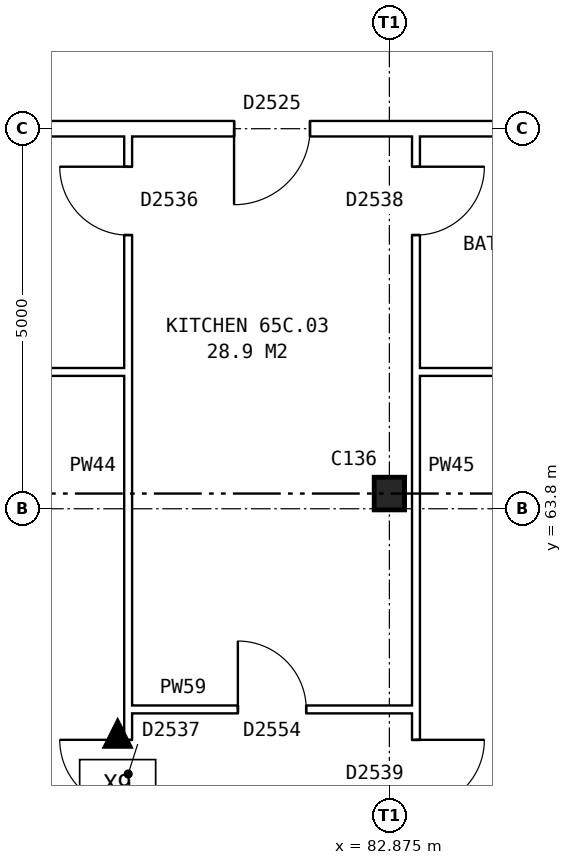
"""IFC4 building model, lengths in metres.
Left out: names, types, materials, properties, quantities, classifications, styles, units other than length and angle.
Written with IfcOpenShell. Run it as: python <this file> out.ifc"""

import sys

from ifc_helpers import new_model, si_unit, direction, frame, frame_2d, origin, origin_2d, place, context, subcontext, project, spatial, rectangle, i_section, extrude, element, fill, save


model = new_model("IFC4")
c1 = context("Model", 3, precision=1e-05, world=origin(), true_north=direction((0.0, 1.0)))
c2 = subcontext(c1, "Body", "Model", "MODEL_VIEW")
j1 = project(units=[si_unit("LENGTHUNIT", "METRE"), si_unit("PLANEANGLEUNIT", "RADIAN")], contexts=[c1])
p1 = place(None, origin())
s1 = spatial("IfcSite", under=j1, at=p1, CompositionType="ELEMENT")
p2 = place(p1, origin())
s2 = spatial("IfcBuilding", under=s1, at=p2, CompositionType="ELEMENT")
p3 = place(p2, frame((0.0, 0.0, 230.7)))
s3 = spatial("IfcBuildingStorey", under=s2, at=p3, CompositionType="ELEMENT", Elevation=230.7)
p4 = place(p3, frame((82.875, 64.0, 0.0), z_axis=(0.0, 0.0, 1.0), x_axis=(1.0, 0.0, 0.0)))
e1 = element("IfcColumn", 1, at=p4, inside=s3, PredefinedType="COLUMN", context=c2, shape_type="SweptSolid", body=[
    extrude(i_section(OverallWidth=0.4, OverallDepth=0.43, WebThickness=0.028, FlangeThickness=0.04, at=origin_2d()), origin(), (0.0, 0.0, 1.0), 2.85),
])
p5 = place(p3, frame((79.438, 61.16, 0.0), z_axis=(0.0, 0.0, 1.0), x_axis=(1.0, 0.0, 0.0)))
e2 = element("IfcWall", 2, at=p5, inside=s3, PredefinedType="PARTITIONING", context=c2, shape_type="SweptSolid", body=[
    extrude(rectangle(XDim=3.787, YDim=0.1, at=frame_2d((1.894, 0.0))), origin(), (0.0, 0.0, 1.0), 2.85),
])
p6 = place(p5, frame((1.444, 0.0, 0.0)))
e3 = element("IfcOpeningElement", 3, at=p6, cuts=e2, PredefinedType="OPENING", context=c2, shape_type="SweptSolid", body=[
    extrude(rectangle(XDim=0.9, YDim=2.1, at=frame_2d((0.45, 1.05))), frame((0.0, 0.06, 0.0), z_axis=(0.0, -1.0, 0.0), x_axis=(1.0, 0.0, 0.0)), (0.0, 0.0, 1.0), 0.12),
])
p7 = place(p3, frame((75.64, 65.6, 0.0), z_axis=(0.0, 0.0, 1.0), x_axis=(1.0, 0.0, 0.0)))
e4 = element("IfcWall", 4, at=p7, inside=s3, PredefinedType="PARTITIONING", context=c2, shape_type="SweptSolid", body=[
    extrude(rectangle(XDim=3.798, YDim=0.1, at=frame_2d((1.899, 0.0))), origin(), (0.0, 0.0, 1.0), 2.85),
])
p8 = place(p3, frame((83.225, 65.6, 0.0), z_axis=(0.0, 0.0, 1.0), x_axis=(1.0, 0.0, 0.0)))
e5 = element("IfcWall", 5, at=p8, inside=s3, PredefinedType="PARTITIONING", context=c2, shape_type="SweptSolid", body=[
    extrude(rectangle(XDim=3.337, YDim=0.1, at=frame_2d((1.668, 0.0))), origin(), (0.0, 0.0, 1.0), 2.85),
])
p9 = place(p3, frame((75.64, 68.8, 0.0), z_axis=(0.0, 0.0, 1.0), x_axis=(1.0, 0.0, 0.0)))
e6 = element("IfcWall", 6, at=p9, inside=s3, PredefinedType="PARTITIONING", context=c2, shape_type="SweptSolid", body=[
    extrude(rectangle(XDim=55.72, YDim=0.2, at=frame_2d((27.86, 0.0))), origin(), (0.0, 0.0, 1.0), 2.85),
])
p10 = place(p9, frame((5.191, 0.0, 0.0)))
e7 = element("IfcOpeningElement", 7, at=p10, cuts=e6, PredefinedType="OPENING", context=c2, shape_type="SweptSolid", body=[
    extrude(rectangle(XDim=1.0, YDim=2.1, at=frame_2d((0.5, 1.05))), frame((0.0, 0.11, 0.0), z_axis=(0.0, -1.0, 0.0), x_axis=(1.0, 0.0, 0.0)), (0.0, 0.0, 1.0), 0.22),
])
p11 = place(p9, frame((12.241, 0.0, 0.0)))
e8 = element("IfcOpeningElement", 8, at=p11, cuts=e6, PredefinedType="OPENING", context=c2, shape_type="SweptSolid", body=[
    extrude(rectangle(XDim=1.0, YDim=2.1, at=frame_2d((0.5, 1.05))), frame((0.0, 0.11, 0.0), z_axis=(0.0, -1.0, 0.0), x_axis=(1.0, 0.0, 0.0)), (0.0, 0.0, 1.0), 0.22),
])
p12 = place(p9, frame((22.553, 0.0, 0.0)))
e9 = element("IfcOpeningElement", 9, at=p12, cuts=e6, PredefinedType="OPENING", context=c2, shape_type="SweptSolid", body=[
    extrude(rectangle(XDim=1.0, YDim=2.1, at=frame_2d((0.5, 1.05))), frame((0.0, 0.11, 0.0), z_axis=(0.0, -1.0, 0.0), x_axis=(1.0, 0.0, 0.0)), (0.0, 0.0, 1.0), 0.22),
])
p13 = place(p9, frame((32.866, 0.0, 0.0)))
e10 = element("IfcOpeningElement", 10, at=p13, cuts=e6, PredefinedType="OPENING", context=c2, shape_type="SweptSolid", body=[
    extrude(rectangle(XDim=1.0, YDim=2.1, at=frame_2d((0.5, 1.05))), frame((0.0, 0.11, 0.0), z_axis=(0.0, -1.0, 0.0), x_axis=(1.0, 0.0, 0.0)), (0.0, 0.0, 1.0), 0.22),
])
p14 = place(p9, frame((36.303, 0.0, 0.0)))
e11 = element("IfcOpeningElement", 11, at=p14, cuts=e6, PredefinedType="OPENING", context=c2, shape_type="SweptSolid", body=[
    extrude(rectangle(XDim=1.0, YDim=2.1, at=frame_2d((0.5, 1.05))), frame((0.0, 0.11, 0.0), z_axis=(0.0, -1.0, 0.0), x_axis=(1.0, 0.0, 0.0)), (0.0, 0.0, 1.0), 0.22),
])
p15 = place(p9, frame((46.616, 0.0, 0.0)))
e12 = element("IfcOpeningElement", 12, at=p15, cuts=e6, PredefinedType="OPENING", context=c2, shape_type="SweptSolid", body=[
    extrude(rectangle(XDim=1.0, YDim=2.1, at=frame_2d((0.5, 1.05))), frame((0.0, 0.11, 0.0), z_axis=(0.0, -1.0, 0.0), x_axis=(1.0, 0.0, 0.0)), (0.0, 0.0, 1.0), 0.22),
])
p16 = place(p9, frame((53.496, 0.0, 0.0)))
e13 = element("IfcOpeningElement", 13, at=p16, cuts=e6, PredefinedType="OPENING", context=c2, shape_type="SweptSolid", body=[
    extrude(rectangle(XDim=1.0, YDim=2.1, at=frame_2d((0.5, 1.05))), frame((0.0, 0.11, 0.0), z_axis=(0.0, -1.0, 0.0), x_axis=(1.0, 0.0, 0.0)), (0.0, 0.0, 1.0), 0.22),
])
p17 = place(p3, frame((79.438, 54.36, 0.0), z_axis=(0.0, 0.0, 1.0), x_axis=(0.0, 1.0, 0.0)))
e14 = element("IfcWall", 14, at=p17, inside=s3, PredefinedType="PARTITIONING", context=c2, shape_type="SweptSolid", body=[
    extrude(rectangle(XDim=14.34, YDim=0.1, at=frame_2d((7.17, 0.0))), origin(), (0.0, 0.0, 1.0), 2.85),
])
p18 = place(p17, frame((5.5, 0.0, 0.0)))
e15 = element("IfcOpeningElement", 15, at=p18, cuts=e14, PredefinedType="OPENING", context=c2, shape_type="SweptSolid", body=[
    extrude(rectangle(XDim=0.9, YDim=2.1, at=frame_2d((0.45, 1.05))), frame((0.0, 0.06, 0.0), z_axis=(0.0, -1.0, 0.0), x_axis=(1.0, 0.0, 0.0)), (0.0, 0.0, 1.0), 0.12),
])
p19 = place(p17, frame((13.04, 0.0, 0.0)))
e16 = element("IfcOpeningElement", 16, at=p19, cuts=e14, PredefinedType="OPENING", context=c2, shape_type="SweptSolid", body=[
    extrude(rectangle(XDim=0.9, YDim=2.1, at=frame_2d((0.45, 1.05))), frame((0.0, 0.06, 0.0), z_axis=(0.0, -1.0, 0.0), x_axis=(1.0, 0.0, 0.0)), (0.0, 0.0, 1.0), 0.12),
])
p20 = place(p3, frame((83.225, 54.36, 0.0), z_axis=(0.0, 0.0, 1.0), x_axis=(0.0, 1.0, 0.0)))
e17 = element("IfcWall", 17, at=p20, inside=s3, PredefinedType="PARTITIONING", context=c2, shape_type="SweptSolid", body=[
    extrude(rectangle(XDim=14.34, YDim=0.1, at=frame_2d((7.17, 0.0))), origin(), (0.0, 0.0, 1.0), 2.85),
])
p21 = place(p20, frame((5.5, 0.0, 0.0)))
e18 = element("IfcOpeningElement", 18, at=p21, cuts=e17, PredefinedType="OPENING", context=c2, shape_type="SweptSolid", body=[
    extrude(rectangle(XDim=0.9, YDim=2.1, at=frame_2d((0.45, 1.05))), frame((0.0, 0.06, 0.0), z_axis=(0.0, -1.0, 0.0), x_axis=(1.0, 0.0, 0.0)), (0.0, 0.0, 1.0), 0.12),
])
p22 = place(p20, frame((13.04, 0.0, 0.0)))
e19 = element("IfcOpeningElement", 19, at=p22, cuts=e17, PredefinedType="OPENING", context=c2, shape_type="SweptSolid", body=[
    extrude(rectangle(XDim=0.9, YDim=2.1, at=frame_2d((0.45, 1.05))), frame((0.0, 0.06, 0.0), z_axis=(0.0, -1.0, 0.0), x_axis=(1.0, 0.0, 0.0)), (0.0, 0.0, 1.0), 0.12),
])
p23 = place(p18, origin())
e20 = element("IfcDoor", 20, at=p23, inside=s3, OperationType="SINGLE_SWING_RIGHT", PredefinedType="DOOR", context=c2, shape_type="SweptSolid", body=[
    extrude(rectangle(XDim=0.9, YDim=2.1, at=frame_2d((0.45, 1.05))), frame((0.0, 0.025, 0.0), z_axis=(0.0, -1.0, 0.0), x_axis=(1.0, 0.0, 0.0)), (0.0, 0.0, 1.0), 0.05),
])
fill(e15, e20)
p24 = place(p21, frame((0.9, 0.0, 0.0), z_axis=(0.0, 0.0, 1.0), x_axis=(-1.0, 0.0, 0.0)))
e21 = element("IfcDoor", 21, at=p24, inside=s3, OperationType="SINGLE_SWING_LEFT", PredefinedType="DOOR", context=c2, shape_type="SweptSolid", body=[
    extrude(rectangle(XDim=0.9, YDim=2.1, at=frame_2d((0.45, 1.05))), frame((0.0, 0.025, 0.0), z_axis=(0.0, -1.0, 0.0), x_axis=(1.0, 0.0, 0.0)), (0.0, 0.0, 1.0), 0.05),
])
fill(e18, e21)
p25 = place(p10, frame((1.0, 0.0, 0.0), z_axis=(0.0, 0.0, 1.0), x_axis=(-1.0, 0.0, 0.0)))
e22 = element("IfcDoor", 22, at=p25, inside=s3, OperationType="SINGLE_SWING_RIGHT", PredefinedType="DOOR", context=c2, shape_type="SweptSolid", body=[
    extrude(rectangle(XDim=1.0, YDim=2.1, at=frame_2d((0.5, 1.05))), frame((0.0, 0.025, 0.0), z_axis=(0.0, -1.0, 0.0), x_axis=(1.0, 0.0, 0.0)), (0.0, 0.0, 1.0), 0.05),
])
fill(e7, e22)
p26 = place(p6, origin())
e23 = element("IfcDoor", 23, at=p26, inside=s3, OperationType="SINGLE_SWING_LEFT", PredefinedType="DOOR", context=c2, shape_type="SweptSolid", body=[
    extrude(rectangle(XDim=0.9, YDim=2.1, at=frame_2d((0.45, 1.05))), frame((0.0, 0.025, 0.0), z_axis=(0.0, -1.0, 0.0), x_axis=(1.0, 0.0, 0.0)), (0.0, 0.0, 1.0), 0.05),
])
fill(e3, e23)
p27 = place(p19, origin())
e24 = element("IfcDoor", 24, at=p27, inside=s3, OperationType="SINGLE_SWING_RIGHT", PredefinedType="DOOR", context=c2, shape_type="SweptSolid", body=[
    extrude(rectangle(XDim=0.9, YDim=2.1, at=frame_2d((0.45, 1.05))), frame((0.0, 0.025, 0.0), z_axis=(0.0, -1.0, 0.0), x_axis=(1.0, 0.0, 0.0)), (0.0, 0.0, 1.0), 0.05),
])
fill(e16, e24)
p28 = place(p22, frame((0.9, 0.0, 0.0), z_axis=(0.0, 0.0, 1.0), x_axis=(-1.0, 0.0, 0.0)))
e25 = element("IfcDoor", 25, at=p28, inside=s3, OperationType="SINGLE_SWING_LEFT", PredefinedType="DOOR", context=c2, shape_type="SweptSolid", body=[
    extrude(rectangle(XDim=0.9, YDim=2.1, at=frame_2d((0.45, 1.05))), frame((0.0, 0.025, 0.0), z_axis=(0.0, -1.0, 0.0), x_axis=(1.0, 0.0, 0.0)), (0.0, 0.0, 1.0), 0.05),
])
fill(e19, e25)
save(model, sys.argv[1])
